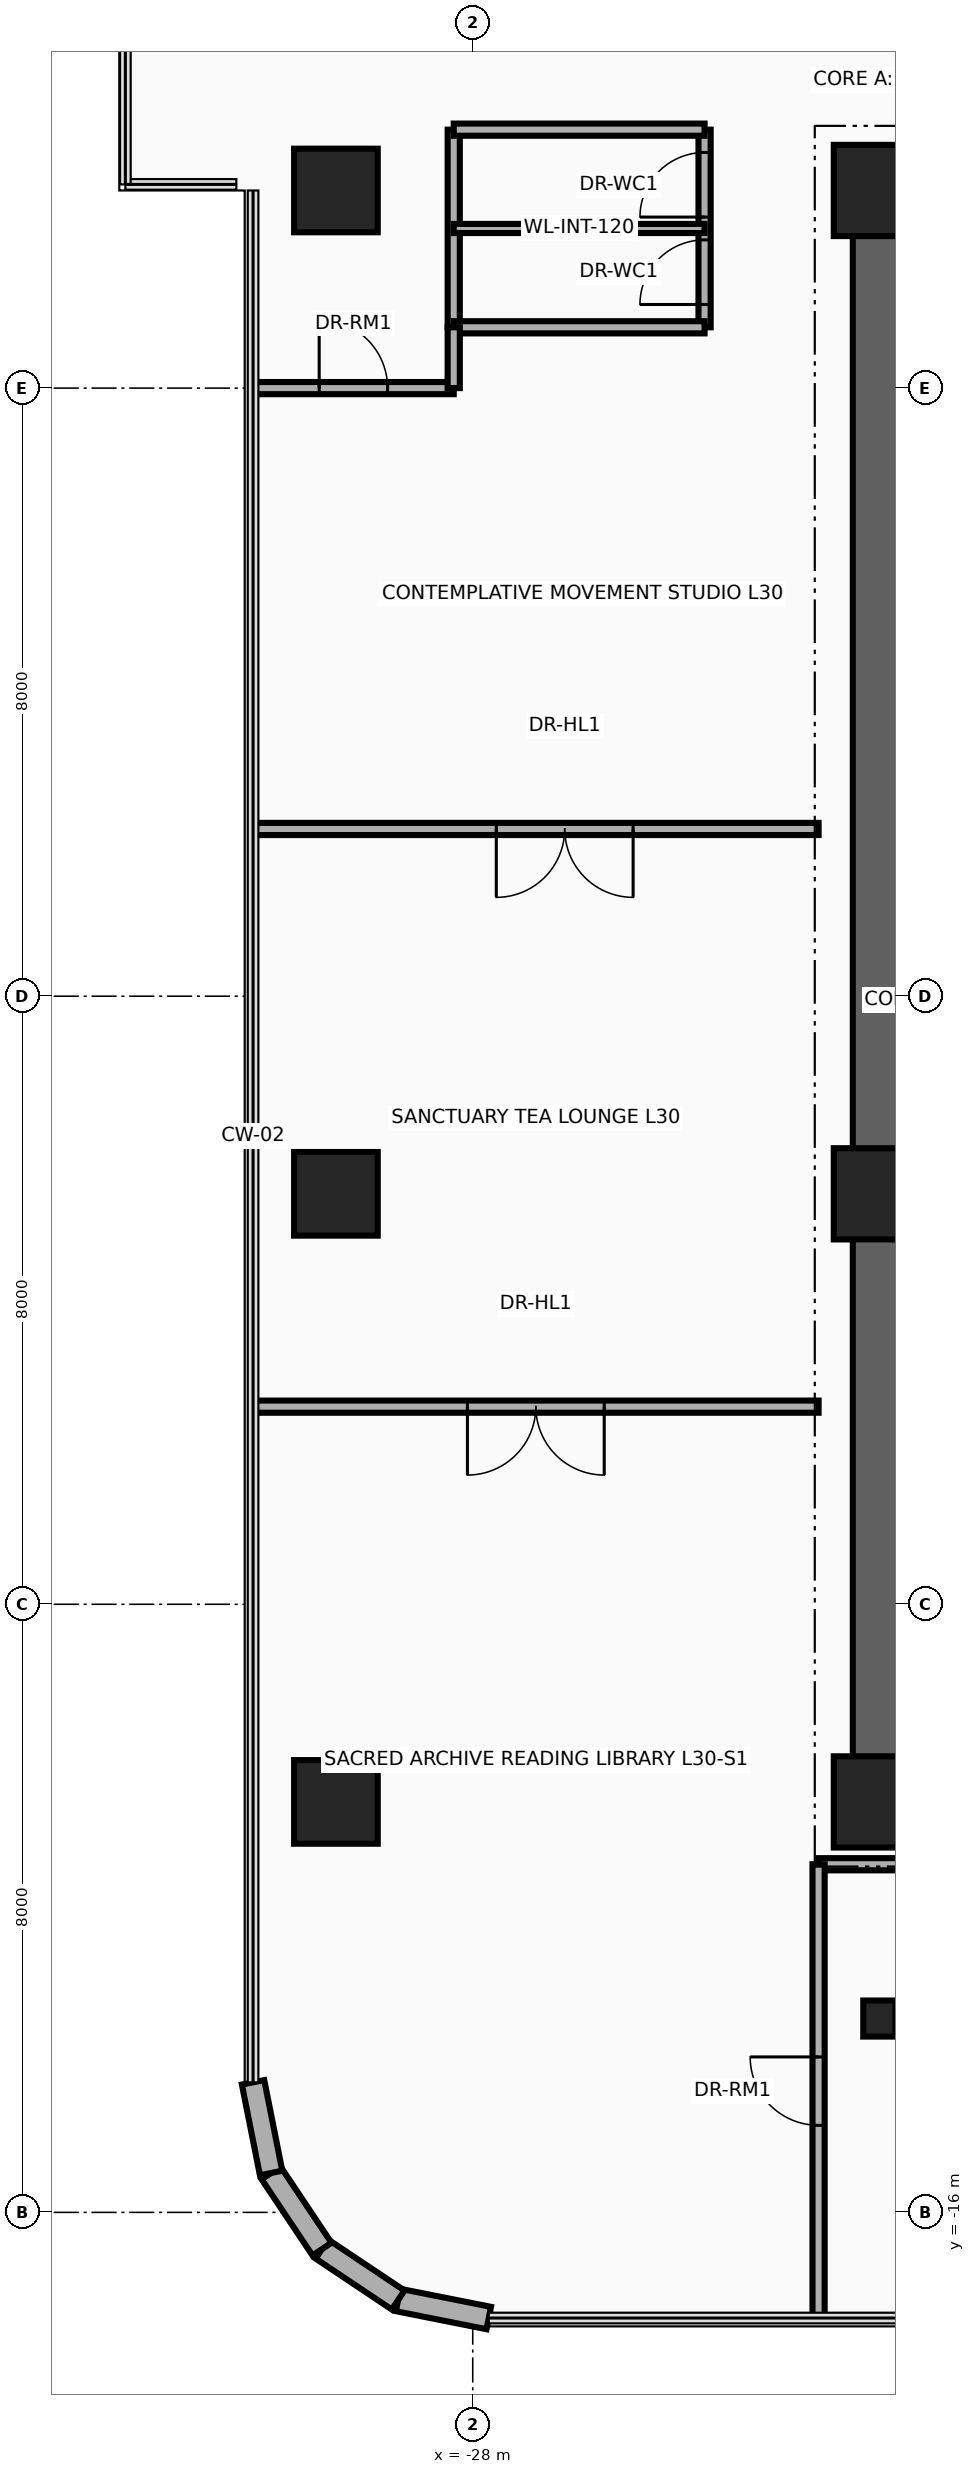
"""IFC4 building model, lengths in metres.
Left out: names, types, materials, properties, quantities, classifications, styles, units other than length and angle.
Written with IfcOpenShell. Run it as: python <this file> out.ifc"""

import sys

from ifc_helpers import new_model, si_unit, direction, frame, frame_2d, origin, origin_2d, place, context, subcontext, project, spatial, rectangle, circle, i_section, extrude, source, transform, mapped, element, fill, save


model = new_model("IFC4")
c1 = context("Model", 3, precision=1e-05, world=origin(), true_north=direction((0.0, 1.0)))
c2 = subcontext(c1, "Body", "Model", "MODEL_VIEW")
j1 = project(units=[si_unit("LENGTHUNIT", "METRE"), si_unit("PLANEANGLEUNIT", "RADIAN")], contexts=[c1])
p1 = place(None, origin())
s1 = spatial("IfcSite", under=j1, at=p1, CompositionType="ELEMENT")
p2 = place(p1, origin())
s2 = spatial("IfcBuilding", under=s1, at=p2, CompositionType="ELEMENT")
p3 = place(p2, frame((0.0, 0.0, 120.5)))
s3 = spatial("IfcBuildingStorey", under=s2, at=p3, CompositionType="ELEMENT", Elevation=120.5)
p4 = place(p3, frame((-22.65, -11.15, 0.0), z_axis=(0.0, 0.0, 1.0), x_axis=(0.0, 1.0, 0.0)))
e1 = element("IfcWall", 1, at=p4, inside=s3, PredefinedType="SHEAR", context=c2, shape_type="SweptSolid", body=[
    extrude(rectangle(XDim=22.3, YDim=0.7, at=frame_2d((11.15, 0.0))), origin(), (0.0, 0.0, 1.0), 3.46),
])
for number, where, z_axis, x_axis in (
    (2, (-22.65, 10.8, 0.0), (0.0, 0.0, 1.0), (1.0, 0.0, 0.0)),
    (3, (-22.65, -10.8, 0.0), (0.0, 0.0, 1.0), (1.0, 0.0, 0.0)),
):
    element("IfcWall", number, at=place(p3, frame(where, z_axis=z_axis, x_axis=x_axis)), inside=s3, PredefinedType="SHEAR", context=c2, shape_type="SweptSolid", body=[
        extrude(rectangle(XDim=10.25, YDim=0.7, at=frame_2d((5.125, 0.0))), origin(), (0.0, 0.0, 1.0), 3.46),
    ])
m1 = source(origin(), c2, "Body", "SweptSolid", [
    extrude(circle(Radius=0.55, at=origin_2d()), origin(), (0.0, 0.0, 1.0), 3.7),
])
p5 = place(p3, frame((-29.8, -10.6, 0.0), z_axis=(0.0, 0.0, 1.0), x_axis=(1.0, 0.0, 0.0)))
e4 = element("IfcColumn", 4, at=p5, inside=s3, PredefinedType="COLUMN", context=c2, shape_type="MappedRepresentation", body=[
    mapped(m1, transform((0.0, 0.0, 0.0), x_axis=(1.0, 0.0, 0.0), y_axis=(0.0, 1.0, 0.0), z_axis=(0.0, 0.0, 1.0), scale=1.0)),
])
m2 = source(origin(), c2, "Body", "SweptSolid", [
    extrude(rectangle(XDim=1.2, YDim=1.2, at=origin_2d()), origin(), (0.0, 0.0, 1.0), 3.7),
])
p6 = place(p3, frame((-22.65, -10.6, 0.0), z_axis=(0.0, 0.0, 1.0), x_axis=(1.0, 0.0, 0.0)))
e5 = element("IfcColumn", 5, at=p6, inside=s3, PredefinedType="COLUMN", context=c2, shape_type="MappedRepresentation", body=[
    mapped(m2, transform((0.0, 0.0, 0.0), x_axis=(1.0, 0.0, 0.0), y_axis=(0.0, 1.0, 0.0), z_axis=(0.0, 0.0, 1.0), scale=1.0)),
])
p7 = place(p3, frame((-29.8, -2.6, 0.0), z_axis=(0.0, 0.0, 1.0), x_axis=(1.0, 0.0, 0.0)))
e6 = element("IfcColumn", 6, at=p7, inside=s3, PredefinedType="COLUMN", context=c2, shape_type="MappedRepresentation", body=[
    mapped(m1, transform((0.0, 0.0, 0.0), x_axis=(1.0, 0.0, 0.0), y_axis=(0.0, 1.0, 0.0), z_axis=(0.0, 0.0, 1.0), scale=1.0)),
])
p8 = place(p3, frame((-22.65, -2.6, 0.0), z_axis=(0.0, 0.0, 1.0), x_axis=(1.0, 0.0, 0.0)))
e7 = element("IfcColumn", 7, at=p8, inside=s3, PredefinedType="COLUMN", context=c2, shape_type="MappedRepresentation", body=[
    mapped(m2, transform((0.0, 0.0, 0.0), x_axis=(1.0, 0.0, 0.0), y_axis=(0.0, 1.0, 0.0), z_axis=(0.0, 0.0, 1.0), scale=1.0)),
])
p9 = place(p3, frame((-29.8, 10.6, 0.0), z_axis=(0.0, 0.0, 1.0), x_axis=(1.0, 0.0, 0.0)))
e8 = element("IfcColumn", 8, at=p9, inside=s3, PredefinedType="COLUMN", context=c2, shape_type="MappedRepresentation", body=[
    mapped(m1, transform((0.0, 0.0, 0.0), x_axis=(1.0, 0.0, 0.0), y_axis=(0.0, 1.0, 0.0), z_axis=(0.0, 0.0, 1.0), scale=1.0)),
])
p10 = place(p3, frame((-22.65, 10.6, 0.0), z_axis=(0.0, 0.0, 1.0), x_axis=(1.0, 0.0, 0.0)))
e9 = element("IfcColumn", 9, at=p10, inside=s3, PredefinedType="COLUMN", context=c2, shape_type="MappedRepresentation", body=[
    mapped(m2, transform((0.0, 0.0, 0.0), x_axis=(1.0, 0.0, 0.0), y_axis=(0.0, 1.0, 0.0), z_axis=(0.0, 0.0, 1.0), scale=1.0)),
])
m3 = source(origin(), c2, "Body", "SweptSolid", [
    extrude(i_section(OverallWidth=0.424, OverallDepth=0.474, WebThickness=0.048, FlangeThickness=0.077, at=origin_2d()), origin(), (0.0, 0.0, 1.0), 3.7),
])
p11 = place(p3, frame((-22.65, -13.45, 0.0), z_axis=(0.0, 0.0, 1.0), x_axis=(1.0, 0.0, 0.0)))
e10 = element("IfcColumn", 10, at=p11, inside=s3, PredefinedType="COLUMN", context=c2, shape_type="MappedRepresentation", body=[
    mapped(m3, transform((0.0, 0.0, 0.0), x_axis=(1.0, 0.0, 0.0), y_axis=(0.0, 1.0, 0.0), z_axis=(0.0, 0.0, 1.0), scale=1.0)),
])
p12 = place(p3, frame((-27.789, -17.39, 0.0), z_axis=(0.0, 0.0, 1.0), x_axis=(-0.980804027463, 0.194996050505, 0.0)))
e11 = element("IfcWall", 11, at=p12, inside=s3, PredefinedType="SOLIDWALL", context=c2, shape_type="SweptSolid", body=[
    extrude(rectangle(XDim=1.216, YDim=0.3, at=frame_2d((0.608, 0.0))), origin(), (0.0, 0.0, 1.0), 3.46),
])
for number, where, z_axis, x_axis in (
    (12, (-28.982, -17.153, 0.0), (0.0, 0.0, 1.0), (-0.831, 0.556, 0.0)),
    (13, (-29.983, -16.483, 0.0), (0.0, 0.0, 1.0), (-0.556, 0.831, 0.0)),
):
    element("IfcWall", number, at=place(p3, frame(where, z_axis=z_axis, x_axis=x_axis)), inside=s3, PredefinedType="SOLIDWALL", context=c2, shape_type="SweptSolid", body=[
        extrude(rectangle(XDim=1.205, YDim=0.3, at=frame_2d((0.603, 0.0))), origin(), (0.0, 0.0, 1.0), 3.46),
    ])
p13 = place(p3, frame((-30.653, -15.482, 0.0), z_axis=(0.0, 0.0, 1.0), x_axis=(-0.194996050505, 0.980804027463, 0.0)))
e14 = element("IfcWall", 14, at=p13, inside=s3, PredefinedType="SOLIDWALL", context=c2, shape_type="SweptSolid", body=[
    extrude(rectangle(XDim=1.216, YDim=0.3, at=frame_2d((0.608, 0.0))), origin(), (0.0, 0.0, 1.0), 3.46),
])
p14 = place(p3, frame((-28.25, 8.8, 0.0), z_axis=(0.0, 0.0, 1.0), x_axis=(0.0, 1.0, 0.0)))
e15 = element("IfcWall", 15, at=p14, inside=s3, PredefinedType="PARTITIONING", context=c2, shape_type="SweptSolid", body=[
    extrude(rectangle(XDim=2.6, YDim=0.16, at=frame_2d((1.3, 0.0))), origin(), (0.0, 0.0, 1.0), 2.666),
])
p15 = place(p3, frame((-24.95, 8.8, 0.0), z_axis=(0.0, 0.0, 1.0), x_axis=(0.0, 1.0, 0.0)))
e16 = element("IfcWall", 16, at=p15, inside=s3, PredefinedType="PARTITIONING", context=c2, shape_type="SweptSolid", body=[
    extrude(rectangle(XDim=2.6, YDim=0.16, at=frame_2d((1.3, 0.0))), origin(), (0.0, 0.0, 1.0), 2.666),
])
p16 = place(p15, frame((0.3, 0.0, 0.0)))
e17 = element("IfcOpeningElement", 17, at=p16, cuts=e16, PredefinedType="OPENING", context=c2, shape_type="SweptSolid", body=[
    extrude(rectangle(XDim=0.85, YDim=2.1, at=frame_2d((0.425, 1.05))), frame((0.0, 0.095, 0.0), z_axis=(0.0, -1.0, 0.0), x_axis=(1.0, 0.0, 0.0)), (0.0, 0.0, 1.0), 0.19),
])
p17 = place(p15, frame((1.45, 0.0, 0.0)))
e18 = element("IfcOpeningElement", 18, at=p17, cuts=e16, PredefinedType="OPENING", context=c2, shape_type="SweptSolid", body=[
    extrude(rectangle(XDim=0.85, YDim=2.1, at=frame_2d((0.425, 1.05))), frame((0.0, 0.095, 0.0), z_axis=(0.0, -1.0, 0.0), x_axis=(1.0, 0.0, 0.0)), (0.0, 0.0, 1.0), 0.19),
])
for number, where, z_axis, x_axis in (
    (19, (-28.25, 8.8, 0.0), (0.0, 0.0, 1.0), (1.0, 0.0, 0.0)),
    (20, (-28.25, 11.4, 0.0), (0.0, 0.0, 1.0), (1.0, 0.0, 0.0)),
):
    element("IfcWall", number, at=place(p3, frame(where, z_axis=z_axis, x_axis=x_axis)), inside=s3, PredefinedType="PARTITIONING", context=c2, shape_type="SweptSolid", body=[
        extrude(rectangle(XDim=3.3, YDim=0.16, at=frame_2d((1.65, 0.0))), origin(), (0.0, 0.0, 1.0), 3.46),
    ])
p18 = place(p3, frame((-28.25, 10.1, 0.0), z_axis=(0.0, 0.0, 1.0), x_axis=(1.0, 0.0, 0.0)))
e21 = element("IfcWall", 21, at=p18, inside=s3, PredefinedType="PARTITIONING", context=c2, shape_type="SweptSolid", body=[
    extrude(rectangle(XDim=3.3, YDim=0.12, at=frame_2d((1.65, 0.0))), origin(), (0.0, 0.0, 1.0), 3.46),
])
p19 = place(p3, frame((-23.45, -11.42, 0.0), z_axis=(0.0, 0.0, 1.0), x_axis=(1.0, 0.0, 0.0)))
e22 = element("IfcWall", 22, at=p19, inside=s3, PredefinedType="PARTITIONING", context=c2, shape_type="SweptSolid", body=[
    extrude(rectangle(XDim=13.84, YDim=0.16, at=frame_2d((6.92, 0.0))), origin(), (0.0, 0.0, 1.0), 2.834),
])
p20 = place(p3, frame((-23.45, -17.39, 0.0), z_axis=(0.0, 0.0, 1.0), x_axis=(0.0, 1.0, 0.0)))
e23 = element("IfcWall", 23, at=p20, inside=s3, PredefinedType="PARTITIONING", context=c2, shape_type="SweptSolid", body=[
    extrude(rectangle(XDim=5.97, YDim=0.16, at=frame_2d((2.985, 0.0))), origin(), (0.0, 0.0, 1.0), 3.46),
])
p21 = place(p20, frame((2.535, 0.0, 0.0)))
e24 = element("IfcOpeningElement", 24, at=p21, cuts=e23, PredefinedType="OPENING", context=c2, shape_type="SweptSolid", body=[
    extrude(rectangle(XDim=0.9, YDim=2.1, at=frame_2d((0.45, 1.05))), frame((0.0, 0.095, 0.0), z_axis=(0.0, -1.0, 0.0), x_axis=(1.0, 0.0, 0.0)), (0.0, 0.0, 1.0), 0.19),
])
p22 = place(p3, frame((-30.89, -5.4, 0.0), z_axis=(0.0, 0.0, 1.0), x_axis=(1.0, 0.0, 0.0)))
e25 = element("IfcWall", 25, at=p22, inside=s3, PredefinedType="PARTITIONING", context=c2, shape_type="SweptSolid", body=[
    extrude(rectangle(XDim=7.44, YDim=0.16, at=frame_2d((3.72, 0.0))), origin(), (0.0, 0.0, 1.0), 2.896),
])
p23 = place(p22, frame((2.82, 0.0, 0.0)))
e26 = element("IfcOpeningElement", 26, at=p23, cuts=e25, PredefinedType="OPENING", context=c2, shape_type="SweptSolid", body=[
    extrude(rectangle(XDim=1.8, YDim=2.15, at=frame_2d((0.9, 1.075))), frame((0.0, 0.095, 0.0), z_axis=(0.0, -1.0, 0.0), x_axis=(1.0, 0.0, 0.0)), (0.0, 0.0, 1.0), 0.19),
])
p24 = place(p3, frame((-30.89, 8.0, 0.0), z_axis=(0.0, 0.0, 1.0), x_axis=(1.0, 0.0, 0.0)))
e27 = element("IfcWall", 27, at=p24, inside=s3, PredefinedType="PARTITIONING", context=c2, shape_type="SweptSolid", body=[
    extrude(rectangle(XDim=2.64, YDim=0.16, at=frame_2d((1.32, 0.0))), origin(), (0.0, 0.0, 1.0), 2.896),
])
p25 = place(p24, frame((0.87, 0.0, 0.0)))
e28 = element("IfcOpeningElement", 28, at=p25, cuts=e27, PredefinedType="OPENING", context=c2, shape_type="SweptSolid", body=[
    extrude(rectangle(XDim=0.9, YDim=2.1, at=frame_2d((0.45, 1.05))), frame((0.0, 0.095, 0.0), z_axis=(0.0, -1.0, 0.0), x_axis=(1.0, 0.0, 0.0)), (0.0, 0.0, 1.0), 0.19),
])
p26 = place(p3, frame((-28.25, 8.0, 0.0), z_axis=(0.0, 0.0, 1.0), x_axis=(0.0, 1.0, 0.0)))
e29 = element("IfcWall", 29, at=p26, inside=s3, PredefinedType="PARTITIONING", context=c2, shape_type="SweptSolid", body=[
    extrude(rectangle(XDim=0.8, YDim=0.16, at=frame_2d((0.4, 0.0))), origin(), (0.0, 0.0, 1.0), 2.988),
])
p27 = place(p3, frame((-30.89, 2.2, 0.0), z_axis=(0.0, 0.0, 1.0), x_axis=(1.0, 0.0, 0.0)))
e30 = element("IfcWall", 30, at=p27, inside=s3, PredefinedType="PARTITIONING", context=c2, shape_type="SweptSolid", body=[
    extrude(rectangle(XDim=7.44, YDim=0.16, at=frame_2d((3.72, 0.0))), origin(), (0.0, 0.0, 1.0), 2.896),
])
p28 = place(p27, frame((3.2, 0.0, 0.0)))
e31 = element("IfcOpeningElement", 31, at=p28, cuts=e30, PredefinedType="OPENING", context=c2, shape_type="SweptSolid", body=[
    extrude(rectangle(XDim=1.8, YDim=2.15, at=frame_2d((0.9, 1.075))), frame((0.0, 0.095, 0.0), z_axis=(0.0, -1.0, 0.0), x_axis=(1.0, 0.0, 0.0)), (0.0, 0.0, 1.0), 0.19),
])
p29 = place(p16, origin())
e32 = element("IfcDoor", 32, at=p29, inside=s3, OperationType="SINGLE_SWING_LEFT", PredefinedType="DOOR", context=c2, shape_type="SweptSolid", body=[
    extrude(rectangle(XDim=0.85, YDim=2.1, at=frame_2d((0.425, 1.05))), frame((0.0, 0.025, 0.0), z_axis=(0.0, -1.0, 0.0), x_axis=(1.0, 0.0, 0.0)), (0.0, 0.0, 1.0), 0.05),
])
fill(e17, e32)
p30 = place(p17, origin())
e33 = element("IfcDoor", 33, at=p30, inside=s3, OperationType="SINGLE_SWING_RIGHT", PredefinedType="DOOR", context=c2, shape_type="SweptSolid", body=[
    extrude(rectangle(XDim=0.85, YDim=2.1, at=frame_2d((0.425, 1.05))), frame((0.0, 0.025, 0.0), z_axis=(0.0, -1.0, 0.0), x_axis=(1.0, 0.0, 0.0)), (0.0, 0.0, 1.0), 0.05),
])
fill(e18, e33)
p31 = place(p23, frame((1.8, 0.0, 0.0), z_axis=(0.0, 0.0, 1.0), x_axis=(-1.0, 0.0, 0.0)))
e34 = element("IfcDoor", 34, at=p31, inside=s3, OperationType="DOUBLE_DOOR_SINGLE_SWING", PredefinedType="DOOR", context=c2, shape_type="SweptSolid", body=[
    extrude(rectangle(XDim=1.8, YDim=2.15, at=frame_2d((0.9, 1.075))), frame((0.0, 0.025, 0.0), z_axis=(0.0, -1.0, 0.0), x_axis=(1.0, 0.0, 0.0)), (0.0, 0.0, 1.0), 0.05),
])
fill(e26, e34)
p32 = place(p25, origin())
e35 = element("IfcDoor", 35, at=p32, inside=s3, OperationType="SINGLE_SWING_RIGHT", PredefinedType="DOOR", context=c2, shape_type="SweptSolid", body=[
    extrude(rectangle(XDim=0.9, YDim=2.1, at=frame_2d((0.45, 1.05))), frame((0.0, 0.025, 0.0), z_axis=(0.0, -1.0, 0.0), x_axis=(1.0, 0.0, 0.0)), (0.0, 0.0, 1.0), 0.05),
])
fill(e28, e35)
p33 = place(p28, frame((1.8, 0.0, 0.0), z_axis=(0.0, 0.0, 1.0), x_axis=(-1.0, 0.0, 0.0)))
e36 = element("IfcDoor", 36, at=p33, inside=s3, OperationType="DOUBLE_DOOR_SINGLE_SWING", PredefinedType="DOOR", context=c2, shape_type="SweptSolid", body=[
    extrude(rectangle(XDim=1.8, YDim=2.15, at=frame_2d((0.9, 1.075))), frame((0.0, 0.025, 0.0), z_axis=(0.0, -1.0, 0.0), x_axis=(1.0, 0.0, 0.0)), (0.0, 0.0, 1.0), 0.05),
])
fill(e31, e36)
p34 = place(p21, origin())
e37 = element("IfcDoor", 37, at=p34, inside=s3, OperationType="SINGLE_SWING_RIGHT", PredefinedType="DOOR", context=c2, shape_type="SweptSolid", body=[
    extrude(rectangle(XDim=0.9, YDim=2.1, at=frame_2d((0.45, 1.05))), frame((0.0, 0.025, 0.0), z_axis=(0.0, -1.0, 0.0), x_axis=(1.0, 0.0, 0.0)), (0.0, 0.0, 1.0), 0.05),
])
fill(e24, e37)
save(model, sys.argv[1])
